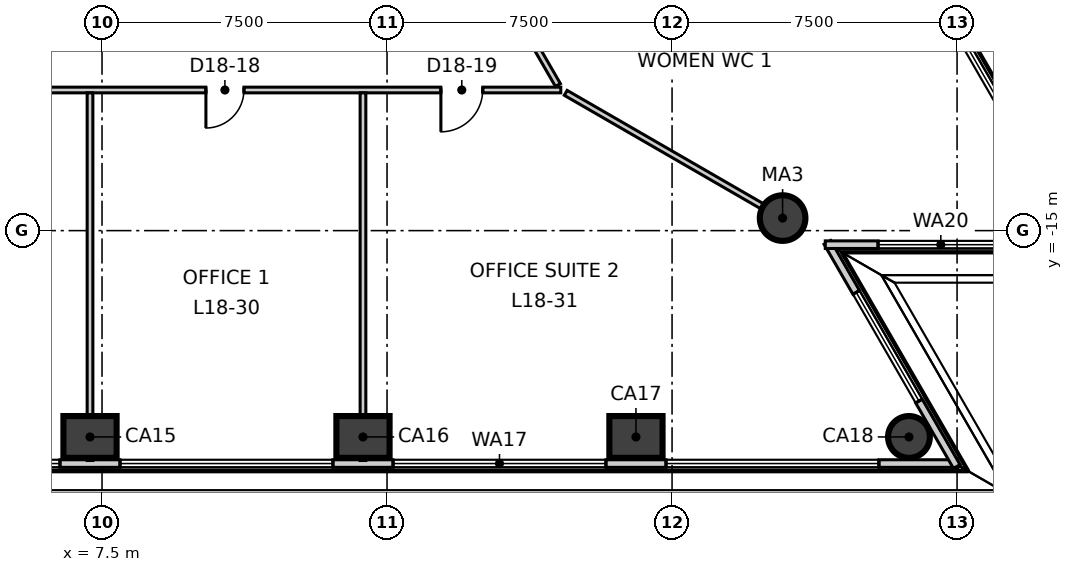
"""IFC4 building model, lengths in metres.
Left out: names, types, materials, properties, quantities, classifications, styles, units other than length and angle.
Written with IfcOpenShell. Run it as: python <this file> out.ifc"""

import sys

from ifc_helpers import new_model, si_unit, direction, frame, frame_2d, origin, origin_2d, place, context, subcontext, project, spatial, rectangle, circle, extrude, element, fill, save


model = new_model("IFC4")
c1 = context("Model", 3, precision=1e-05, world=origin(), true_north=direction((0.0, 1.0)))
c2 = subcontext(c1, "Body", "Model", "MODEL_VIEW")
j1 = project(units=[si_unit("LENGTHUNIT", "METRE"), si_unit("PLANEANGLEUNIT", "RADIAN")], contexts=[c1])
p1 = place(None, origin())
s1 = spatial("IfcSite", under=j1, at=p1, CompositionType="ELEMENT")
p2 = place(p1, origin())
s2 = spatial("IfcBuilding", under=s1, at=p2, CompositionType="ELEMENT")
p3 = place(p2, frame((0.0, 0.0, 83.3)))
s3 = spatial("IfcBuildingStorey", under=s2, at=p3, CompositionType="ELEMENT", Elevation=83.3)
for number, where, z_axis, x_axis in (
    (1, (7.184, -20.429, -0.3), (0.0, 0.0, 1.0), (1.0, 0.0, 0.0)),
    (2, (14.367, -20.429, -0.3), (0.0, 0.0, 1.0), (1.0, 0.0, 0.0)),
    (3, (21.55, -20.429, -0.3), (0.0, 0.0, 1.0), (1.0, 0.0, 0.0)),
):
    element("IfcColumn", number, at=place(p3, frame(where, z_axis=z_axis, x_axis=x_axis)), inside=s3, PredefinedType="COLUMN", context=c2, shape_type="SweptSolid", body=[
        extrude(rectangle(XDim=1.4, YDim=1.1, at=origin_2d()), origin(), (0.0, 0.0, 1.0), 4.0),
    ])
p4 = place(p3, frame((28.734, -20.429, -0.3), z_axis=(0.0, 0.0, 1.0), x_axis=(1.0, 0.0, 0.0)))
e4 = element("IfcColumn", 4, at=p4, inside=s3, PredefinedType="COLUMN", context=c2, shape_type="SweptSolid", body=[
    extrude(circle(Radius=0.55, at=origin_2d()), origin(), (0.0, 0.0, 1.0), 4.0),
])
p5 = place(p3, frame((25.409, -14.67, -0.3), z_axis=(0.0, 0.0, 1.0), x_axis=(1.0, 0.0, 0.0)))
e5 = element("IfcColumn", 5, at=p5, inside=s3, PredefinedType="COLUMN", context=c2, shape_type="SweptSolid", body=[
    extrude(circle(Radius=0.6, at=origin_2d()), origin(), (0.0, 0.0, 1.0), 4.0),
])
p6 = place(p3, frame((-30.037, -21.129, 0.0), z_axis=(0.0, 0.0, 1.0), x_axis=(1.0, 0.0, 0.0)))
e6 = element("IfcWall", 6, at=p6, inside=s3, PredefinedType="ELEMENTEDWALL", context=c2, shape_type="SweptSolid", body=[
    extrude(rectangle(XDim=60.054, YDim=0.2, at=frame_2d((30.027, 0.0))), origin(), (0.0, 0.0, 1.0), 3.7),
])
p7 = place(p6, frame((2.095, 0.0, 0.9)))
e7 = element("IfcOpeningElement", 7, at=p7, cuts=e6, PredefinedType="OPENING", context=c2, shape_type="SweptSolid", body=[
    extrude(rectangle(XDim=5.6, YDim=2.5, at=frame_2d((2.8, 1.25))), frame((0.0, 0.11, 0.0), z_axis=(0.0, -1.0, 0.0), x_axis=(1.0, 0.0, 0.0)), (0.0, 0.0, 1.0), 0.22),
])
p8 = place(p6, frame((9.278, 0.0, 0.9)))
e8 = element("IfcOpeningElement", 8, at=p8, cuts=e6, PredefinedType="OPENING", context=c2, shape_type="SweptSolid", body=[
    extrude(rectangle(XDim=5.6, YDim=2.5, at=frame_2d((2.8, 1.25))), frame((0.0, 0.11, 0.0), z_axis=(0.0, -1.0, 0.0), x_axis=(1.0, 0.0, 0.0)), (0.0, 0.0, 1.0), 0.22),
])
p9 = place(p6, frame((16.462, 0.0, 0.9)))
e9 = element("IfcOpeningElement", 9, at=p9, cuts=e6, PredefinedType="OPENING", context=c2, shape_type="SweptSolid", body=[
    extrude(rectangle(XDim=5.6, YDim=2.5, at=frame_2d((2.8, 1.25))), frame((0.0, 0.11, 0.0), z_axis=(0.0, -1.0, 0.0), x_axis=(1.0, 0.0, 0.0)), (0.0, 0.0, 1.0), 0.22),
])
p10 = place(p6, frame((23.645, 0.0, 0.9)))
e10 = element("IfcOpeningElement", 10, at=p10, cuts=e6, PredefinedType="OPENING", context=c2, shape_type="SweptSolid", body=[
    extrude(rectangle(XDim=5.6, YDim=2.5, at=frame_2d((2.8, 1.25))), frame((0.0, 0.11, 0.0), z_axis=(0.0, -1.0, 0.0), x_axis=(1.0, 0.0, 0.0)), (0.0, 0.0, 1.0), 0.22),
])
p11 = place(p6, frame((30.829, 0.0, 0.9)))
e11 = element("IfcOpeningElement", 11, at=p11, cuts=e6, PredefinedType="OPENING", context=c2, shape_type="SweptSolid", body=[
    extrude(rectangle(XDim=5.6, YDim=2.5, at=frame_2d((2.8, 1.25))), frame((0.0, 0.11, 0.0), z_axis=(0.0, -1.0, 0.0), x_axis=(1.0, 0.0, 0.0)), (0.0, 0.0, 1.0), 0.22),
])
p12 = place(p6, frame((38.012, 0.0, 0.9)))
e12 = element("IfcOpeningElement", 12, at=p12, cuts=e6, PredefinedType="OPENING", context=c2, shape_type="SweptSolid", body=[
    extrude(rectangle(XDim=5.6, YDim=2.5, at=frame_2d((2.8, 1.25))), frame((0.0, 0.11, 0.0), z_axis=(0.0, -1.0, 0.0), x_axis=(1.0, 0.0, 0.0)), (0.0, 0.0, 1.0), 0.22),
])
p13 = place(p6, frame((45.196, 0.0, 0.9)))
e13 = element("IfcOpeningElement", 13, at=p13, cuts=e6, PredefinedType="OPENING", context=c2, shape_type="SweptSolid", body=[
    extrude(rectangle(XDim=5.6, YDim=2.5, at=frame_2d((2.8, 1.25))), frame((0.0, 0.11, 0.0), z_axis=(0.0, -1.0, 0.0), x_axis=(1.0, 0.0, 0.0)), (0.0, 0.0, 1.0), 0.22),
])
p14 = place(p6, frame((52.379, 0.0, 0.9)))
e14 = element("IfcOpeningElement", 14, at=p14, cuts=e6, PredefinedType="OPENING", context=c2, shape_type="SweptSolid", body=[
    extrude(rectangle(XDim=5.6, YDim=2.5, at=frame_2d((2.8, 1.25))), frame((0.0, 0.11, 0.0), z_axis=(0.0, -1.0, 0.0), x_axis=(1.0, 0.0, 0.0)), (0.0, 0.0, 1.0), 0.22),
])
p15 = place(p3, frame((29.992, -21.207, 0.0), z_axis=(0.0, 0.0, 1.0), x_axis=(-0.499983120418, 0.866035148996, 0.0)))
e15 = element("IfcWall", 15, at=p15, inside=s3, PredefinedType="ELEMENTEDWALL", context=c2, shape_type="SweptSolid", body=[
    extrude(rectangle(XDim=6.81, YDim=0.2, at=frame_2d((3.405, 0.0))), origin(), (0.0, 0.0, 1.0), 3.7),
])
p16 = place(p15, frame((1.99, 0.0, 0.9)))
e16 = element("IfcOpeningElement", 16, at=p16, cuts=e15, PredefinedType="OPENING", context=c2, shape_type="SweptSolid", body=[
    extrude(rectangle(XDim=3.3, YDim=2.5, at=frame_2d((1.65, 1.25))), frame((0.0, 0.11, 0.0), z_axis=(0.0, -1.0, 0.0), x_axis=(1.0, 0.0, 0.0)), (0.0, 0.0, 1.0), 0.22),
])
p17 = place(p3, frame((26.532, -15.37, 0.0), z_axis=(0.0, 0.0, 1.0), x_axis=(1.0, 0.0, 0.0)))
e17 = element("IfcWall", 17, at=p17, inside=s3, PredefinedType="ELEMENTEDWALL", context=c2, shape_type="SweptSolid", body=[
    extrude(rectangle(XDim=6.81, YDim=0.2, at=frame_2d((3.405, 0.0))), origin(), (0.0, 0.0, 1.0), 3.7),
])
p18 = place(p17, frame((1.39, 0.0, 0.9)))
e18 = element("IfcOpeningElement", 18, at=p18, cuts=e17, PredefinedType="OPENING", context=c2, shape_type="SweptSolid", body=[
    extrude(rectangle(XDim=3.3, YDim=2.5, at=frame_2d((1.65, 1.25))), frame((0.0, 0.11, 0.0), z_axis=(0.0, -1.0, 0.0), x_axis=(1.0, 0.0, 0.0)), (0.0, 0.0, 1.0), 0.22),
])
p19 = place(p3, frame((33.317, -15.448, 0.0), z_axis=(0.0, 0.0, 1.0), x_axis=(-0.499999874703, 0.866025476125, 0.0)))
e19 = element("IfcWall", 19, at=p19, inside=s3, PredefinedType="ELEMENTEDWALL", context=c2, shape_type="SweptSolid", body=[
    extrude(rectangle(XDim=60.054, YDim=0.2, at=frame_2d((30.027, 0.0))), origin(), (0.0, 0.0, 1.0), 3.7),
])
p20 = place(p19, frame((2.094, 0.0, 0.9)))
e20 = element("IfcOpeningElement", 20, at=p20, cuts=e19, PredefinedType="OPENING", context=c2, shape_type="SweptSolid", body=[
    extrude(rectangle(XDim=5.6, YDim=2.5, at=frame_2d((2.8, 1.25))), frame((0.0, 0.11, 0.0), z_axis=(0.0, -1.0, 0.0), x_axis=(1.0, 0.0, 0.0)), (0.0, 0.0, 1.0), 0.22),
])
p21 = place(p19, frame((9.278, 0.0, 0.9)))
e21 = element("IfcOpeningElement", 21, at=p21, cuts=e19, PredefinedType="OPENING", context=c2, shape_type="SweptSolid", body=[
    extrude(rectangle(XDim=5.6, YDim=2.5, at=frame_2d((2.8, 1.25))), frame((0.0, 0.11, 0.0), z_axis=(0.0, -1.0, 0.0), x_axis=(1.0, 0.0, 0.0)), (0.0, 0.0, 1.0), 0.22),
])
p22 = place(p19, frame((16.462, 0.0, 0.9)))
e22 = element("IfcOpeningElement", 22, at=p22, cuts=e19, PredefinedType="OPENING", context=c2, shape_type="SweptSolid", body=[
    extrude(rectangle(XDim=5.6, YDim=2.5, at=frame_2d((2.8, 1.25))), frame((0.0, 0.11, 0.0), z_axis=(0.0, -1.0, 0.0), x_axis=(1.0, 0.0, 0.0)), (0.0, 0.0, 1.0), 0.22),
])
p23 = place(p19, frame((23.645, 0.0, 0.9)))
e23 = element("IfcOpeningElement", 23, at=p23, cuts=e19, PredefinedType="OPENING", context=c2, shape_type="SweptSolid", body=[
    extrude(rectangle(XDim=5.6, YDim=2.5, at=frame_2d((2.8, 1.25))), frame((0.0, 0.11, 0.0), z_axis=(0.0, -1.0, 0.0), x_axis=(1.0, 0.0, 0.0)), (0.0, 0.0, 1.0), 0.22),
])
p24 = place(p19, frame((30.829, 0.0, 0.9)))
e24 = element("IfcOpeningElement", 24, at=p24, cuts=e19, PredefinedType="OPENING", context=c2, shape_type="SweptSolid", body=[
    extrude(rectangle(XDim=5.6, YDim=2.5, at=frame_2d((2.8, 1.25))), frame((0.0, 0.11, 0.0), z_axis=(0.0, -1.0, 0.0), x_axis=(1.0, 0.0, 0.0)), (0.0, 0.0, 1.0), 0.22),
])
p25 = place(p19, frame((38.012, 0.0, 0.9)))
e25 = element("IfcOpeningElement", 25, at=p25, cuts=e19, PredefinedType="OPENING", context=c2, shape_type="SweptSolid", body=[
    extrude(rectangle(XDim=5.6, YDim=2.5, at=frame_2d((2.8, 1.25))), frame((0.0, 0.11, 0.0), z_axis=(0.0, -1.0, 0.0), x_axis=(1.0, 0.0, 0.0)), (0.0, 0.0, 1.0), 0.22),
])
p26 = place(p19, frame((45.196, 0.0, 0.9)))
e26 = element("IfcOpeningElement", 26, at=p26, cuts=e19, PredefinedType="OPENING", context=c2, shape_type="SweptSolid", body=[
    extrude(rectangle(XDim=5.6, YDim=2.5, at=frame_2d((2.8, 1.25))), frame((0.0, 0.11, 0.0), z_axis=(0.0, -1.0, 0.0), x_axis=(1.0, 0.0, 0.0)), (0.0, 0.0, 1.0), 0.22),
])
p27 = place(p19, frame((52.379, 0.0, 0.9)))
e27 = element("IfcOpeningElement", 27, at=p27, cuts=e19, PredefinedType="OPENING", context=c2, shape_type="SweptSolid", body=[
    extrude(rectangle(XDim=5.6, YDim=2.5, at=frame_2d((2.8, 1.25))), frame((0.0, 0.11, 0.0), z_axis=(0.0, -1.0, 0.0), x_axis=(1.0, 0.0, 0.0)), (0.0, 0.0, 1.0), 0.22),
])
p28 = place(p3, frame((-19.422, -11.3, 0.0), z_axis=(0.0, 0.0, 1.0), x_axis=(1.0, 0.0, 0.0)))
e28 = element("IfcWall", 28, at=p28, inside=s3, PredefinedType="PARTITIONING", context=c2, shape_type="SweptSolid", body=[
    extrude(rectangle(XDim=38.994, YDim=0.15, at=frame_2d((19.497, 0.0))), origin(), (0.0, 0.0, 1.0), 3.7),
])
p29 = place(p28, frame((1.9, 0.0, 0.0)))
e29 = element("IfcOpeningElement", 29, at=p29, cuts=e28, PredefinedType="OPENING", context=c2, shape_type="SweptSolid", body=[
    extrude(rectangle(XDim=1.1, YDim=2.1, at=frame_2d((0.55, 1.05))), frame((0.0, 0.085, 0.0), z_axis=(0.0, -1.0, 0.0), x_axis=(1.0, 0.0, 0.0)), (0.0, 0.0, 1.0), 0.17),
])
p30 = place(p28, frame((11.705, 0.0, 0.0)))
e30 = element("IfcOpeningElement", 30, at=p30, cuts=e28, PredefinedType="OPENING", context=c2, shape_type="SweptSolid", body=[
    extrude(rectangle(XDim=1.1, YDim=2.1, at=frame_2d((0.55, 1.05))), frame((0.0, 0.085, 0.0), z_axis=(0.0, -1.0, 0.0), x_axis=(1.0, 0.0, 0.0)), (0.0, 0.0, 1.0), 0.17),
])
p31 = place(p28, frame((6.405, 0.0, 0.0)))
e31 = element("IfcOpeningElement", 31, at=p31, cuts=e28, PredefinedType="OPENING", context=c2, shape_type="SweptSolid", body=[
    extrude(rectangle(XDim=0.9, YDim=2.1, at=frame_2d((0.45, 1.05))), frame((0.0, 0.085, 0.0), z_axis=(0.0, -1.0, 0.0), x_axis=(1.0, 0.0, 0.0)), (0.0, 0.0, 1.0), 0.17),
])
p32 = place(p28, frame((9.405, 0.0, 0.0)))
e32 = element("IfcOpeningElement", 32, at=p32, cuts=e28, PredefinedType="OPENING", context=c2, shape_type="SweptSolid", body=[
    extrude(rectangle(XDim=0.9, YDim=2.1, at=frame_2d((0.45, 1.05))), frame((0.0, 0.085, 0.0), z_axis=(0.0, -1.0, 0.0), x_axis=(1.0, 0.0, 0.0)), (0.0, 0.0, 1.0), 0.17),
])
p33 = place(p28, frame((22.472, 0.0, 0.0)))
e33 = element("IfcOpeningElement", 33, at=p33, cuts=e28, PredefinedType="OPENING", context=c2, shape_type="SweptSolid", body=[
    extrude(rectangle(XDim=1.0, YDim=2.1, at=frame_2d((0.5, 1.05))), frame((0.0, 0.085, 0.0), z_axis=(0.0, -1.0, 0.0), x_axis=(1.0, 0.0, 0.0)), (0.0, 0.0, 1.0), 0.17),
])
p34 = place(p28, frame((29.656, 0.0, 0.0)))
e34 = element("IfcOpeningElement", 34, at=p34, cuts=e28, PredefinedType="OPENING", context=c2, shape_type="SweptSolid", body=[
    extrude(rectangle(XDim=1.0, YDim=2.1, at=frame_2d((0.5, 1.05))), frame((0.0, 0.085, 0.0), z_axis=(0.0, -1.0, 0.0), x_axis=(1.0, 0.0, 0.0)), (0.0, 0.0, 1.0), 0.17),
])
p35 = place(p28, frame((35.839, 0.0, 0.0)))
e35 = element("IfcOpeningElement", 35, at=p35, cuts=e28, PredefinedType="OPENING", context=c2, shape_type="SweptSolid", body=[
    extrude(rectangle(XDim=1.1, YDim=2.1, at=frame_2d((0.55, 1.05))), frame((0.0, 0.085, 0.0), z_axis=(0.0, -1.0, 0.0), x_axis=(1.0, 0.0, 0.0)), (0.0, 0.0, 1.0), 0.17),
])
p36 = place(p3, frame((19.702, -11.375, 0.0), z_axis=(0.0, 0.0, 1.0), x_axis=(0.866029956157, -0.499992114976, 0.0)))
e36 = element("IfcWall", 36, at=p36, inside=s3, PredefinedType="PARTITIONING", context=c2, shape_type="SweptSolid", body=[
    extrude(rectangle(XDim=7.21, YDim=0.15, at=frame_2d((3.605, 0.0))), origin(), (0.0, 0.0, 1.0), 3.15),
])
p37 = place(p3, frame((0.075, 22.47, 0.0), z_axis=(0.0, 0.0, 1.0), x_axis=(0.500002280369, -0.866024087209, 0.0)))
e37 = element("IfcWall", 37, at=p37, inside=s3, PredefinedType="PARTITIONING", context=c2, shape_type="SweptSolid", body=[
    extrude(rectangle(XDim=38.844, YDim=0.15, at=frame_2d((19.422, 0.0))), origin(), (0.0, 0.0, 1.0), 3.7),
])
p38 = place(p37, frame((35.844, 0.0, 0.0)))
e38 = element("IfcOpeningElement", 38, at=p38, cuts=e37, PredefinedType="OPENING", context=c2, shape_type="SweptSolid", body=[
    extrude(rectangle(XDim=1.1, YDim=2.1, at=frame_2d((0.55, 1.05))), frame((0.0, 0.085, 0.0), z_axis=(0.0, -1.0, 0.0), x_axis=(1.0, 0.0, 0.0)), (0.0, 0.0, 1.0), 0.17),
])
p39 = place(p37, frame((14.44, 0.0, 0.0)))
e39 = element("IfcOpeningElement", 39, at=p39, cuts=e37, PredefinedType="OPENING", context=c2, shape_type="SweptSolid", body=[
    extrude(rectangle(XDim=1.1, YDim=2.1, at=frame_2d((0.55, 1.05))), frame((0.0, 0.085, 0.0), z_axis=(0.0, -1.0, 0.0), x_axis=(1.0, 0.0, 0.0)), (0.0, 0.0, 1.0), 0.17),
])
p40 = place(p37, frame((31.74, 0.0, 0.0)))
e40 = element("IfcOpeningElement", 40, at=p40, cuts=e37, PredefinedType="OPENING", context=c2, shape_type="SweptSolid", body=[
    extrude(rectangle(XDim=0.9, YDim=2.1, at=frame_2d((0.45, 1.05))), frame((0.0, 0.085, 0.0), z_axis=(0.0, -1.0, 0.0), x_axis=(1.0, 0.0, 0.0)), (0.0, 0.0, 1.0), 0.17),
])
p41 = place(p37, frame((28.54, 0.0, 0.0)))
e41 = element("IfcOpeningElement", 41, at=p41, cuts=e37, PredefinedType="OPENING", context=c2, shape_type="SweptSolid", body=[
    extrude(rectangle(XDim=0.9, YDim=2.1, at=frame_2d((0.45, 1.05))), frame((0.0, 0.085, 0.0), z_axis=(0.0, -1.0, 0.0), x_axis=(1.0, 0.0, 0.0)), (0.0, 0.0, 1.0), 0.17),
])
p42 = place(p37, frame((25.74, 0.0, 0.0)))
e42 = element("IfcOpeningElement", 42, at=p42, cuts=e37, PredefinedType="OPENING", context=c2, shape_type="SweptSolid", body=[
    extrude(rectangle(XDim=1.0, YDim=2.1, at=frame_2d((0.5, 1.05))), frame((0.0, 0.085, 0.0), z_axis=(0.0, -1.0, 0.0), x_axis=(1.0, 0.0, 0.0)), (0.0, 0.0, 1.0), 0.17),
])
p43 = place(p37, frame((1.905, 0.0, 0.0)))
e43 = element("IfcOpeningElement", 43, at=p43, cuts=e37, PredefinedType="OPENING", context=c2, shape_type="SweptSolid", body=[
    extrude(rectangle(XDim=1.1, YDim=2.1, at=frame_2d((0.55, 1.05))), frame((0.0, 0.085, 0.0), z_axis=(0.0, -1.0, 0.0), x_axis=(1.0, 0.0, 0.0)), (0.0, 0.0, 1.0), 0.17),
])
for number, where, z_axis, x_axis in (
    (44, (7.184, -21.049, 0.0), (0.0, 0.0, 1.0), (0.0, 1.0, 0.0)),
    (45, (14.367, -21.049, 0.0), (0.0, 0.0, 1.0), (0.0, 1.0, 0.0)),
):
    element("IfcWall", number, at=place(p3, frame(where, z_axis=z_axis, x_axis=x_axis)), inside=s3, PredefinedType="PARTITIONING", context=c2, shape_type="SweptSolid", body=[
        extrude(rectangle(XDim=9.674, YDim=0.15, at=frame_2d((4.837, 0.0))), origin(), (0.0, 0.0, 1.0), 3.7),
    ])
p44 = place(p11, origin())
e46 = element("IfcWindow", 46, at=p44, inside=s3, PartitioningType="SINGLE_PANEL", PredefinedType="WINDOW", context=c2, shape_type="SweptSolid", body=[
    extrude(rectangle(XDim=5.6, YDim=2.5, at=frame_2d((2.8, 1.25))), frame((0.0, 0.03, 0.0), z_axis=(0.0, -1.0, 0.0), x_axis=(1.0, 0.0, 0.0)), (0.0, 0.0, 1.0), 0.06),
])
fill(e11, e46)
p45 = place(p12, origin())
e47 = element("IfcWindow", 47, at=p45, inside=s3, PartitioningType="SINGLE_PANEL", PredefinedType="WINDOW", context=c2, shape_type="SweptSolid", body=[
    extrude(rectangle(XDim=5.6, YDim=2.5, at=frame_2d((2.8, 1.25))), frame((0.0, 0.03, 0.0), z_axis=(0.0, -1.0, 0.0), x_axis=(1.0, 0.0, 0.0)), (0.0, 0.0, 1.0), 0.06),
])
fill(e12, e47)
p46 = place(p13, origin())
e48 = element("IfcWindow", 48, at=p46, inside=s3, PartitioningType="SINGLE_PANEL", PredefinedType="WINDOW", context=c2, shape_type="SweptSolid", body=[
    extrude(rectangle(XDim=5.6, YDim=2.5, at=frame_2d((2.8, 1.25))), frame((0.0, 0.03, 0.0), z_axis=(0.0, -1.0, 0.0), x_axis=(1.0, 0.0, 0.0)), (0.0, 0.0, 1.0), 0.06),
])
fill(e13, e48)
p47 = place(p14, origin())
e49 = element("IfcWindow", 49, at=p47, inside=s3, PartitioningType="SINGLE_PANEL", PredefinedType="WINDOW", context=c2, shape_type="SweptSolid", body=[
    extrude(rectangle(XDim=5.6, YDim=2.5, at=frame_2d((2.8, 1.25))), frame((0.0, 0.03, 0.0), z_axis=(0.0, -1.0, 0.0), x_axis=(1.0, 0.0, 0.0)), (0.0, 0.0, 1.0), 0.06),
])
fill(e14, e49)
p48 = place(p16, origin())
e50 = element("IfcWindow", 50, at=p48, inside=s3, PartitioningType="SINGLE_PANEL", PredefinedType="WINDOW", context=c2, shape_type="SweptSolid", body=[
    extrude(rectangle(XDim=3.3, YDim=2.5, at=frame_2d((1.65, 1.25))), frame((0.0, 0.03, 0.0), z_axis=(0.0, -1.0, 0.0), x_axis=(1.0, 0.0, 0.0)), (0.0, 0.0, 1.0), 0.06),
])
fill(e16, e50)
p49 = place(p18, origin())
e51 = element("IfcWindow", 51, at=p49, inside=s3, PartitioningType="SINGLE_PANEL", PredefinedType="WINDOW", context=c2, shape_type="SweptSolid", body=[
    extrude(rectangle(XDim=3.3, YDim=2.5, at=frame_2d((1.65, 1.25))), frame((0.0, 0.03, 0.0), z_axis=(0.0, -1.0, 0.0), x_axis=(1.0, 0.0, 0.0)), (0.0, 0.0, 1.0), 0.06),
])
fill(e18, e51)
p50 = place(p20, origin())
e52 = element("IfcWindow", 52, at=p50, inside=s3, PartitioningType="SINGLE_PANEL", PredefinedType="WINDOW", context=c2, shape_type="SweptSolid", body=[
    extrude(rectangle(XDim=5.6, YDim=2.5, at=frame_2d((2.8, 1.25))), frame((0.0, 0.03, 0.0), z_axis=(0.0, -1.0, 0.0), x_axis=(1.0, 0.0, 0.0)), (0.0, 0.0, 1.0), 0.06),
])
fill(e20, e52)
p51 = place(p34, origin())
e53 = element("IfcDoor", 53, at=p51, inside=s3, OperationType="SINGLE_SWING_LEFT", PredefinedType="DOOR", context=c2, shape_type="SweptSolid", body=[
    extrude(rectangle(XDim=1.0, YDim=2.1, at=frame_2d((0.5, 1.05))), frame((0.0, 0.025, 0.0), z_axis=(0.0, -1.0, 0.0), x_axis=(1.0, 0.0, 0.0)), (0.0, 0.0, 1.0), 0.05),
])
fill(e34, e53)
p52 = place(p35, origin())
e54 = element("IfcDoor", 54, at=p52, inside=s3, OperationType="SINGLE_SWING_LEFT", PredefinedType="DOOR", context=c2, shape_type="SweptSolid", body=[
    extrude(rectangle(XDim=1.1, YDim=2.1, at=frame_2d((0.55, 1.05))), frame((0.0, 0.025, 0.0), z_axis=(0.0, -1.0, 0.0), x_axis=(1.0, 0.0, 0.0)), (0.0, 0.0, 1.0), 0.05),
])
fill(e35, e54)
save(model, sys.argv[1])
